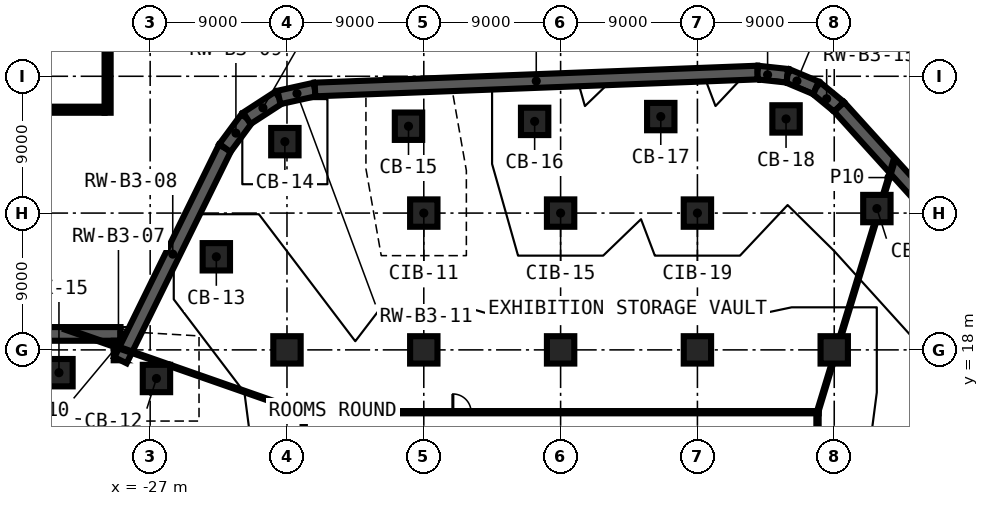
"""IFC4 building model, lengths in metres.
Left out: names, types, materials, properties, quantities, classifications, styles, units other than length and angle.
Written with IfcOpenShell. Run it as: python <this file> out.ifc"""

import sys

from ifc_helpers import new_model, si_unit, direction, frame, frame_2d, origin, origin_2d, place, context, subcontext, project, spatial, polyline, rectangle, outline, extrude, element, fill, save


model = new_model("IFC4")
c1 = context("Model", 3, precision=1e-05, world=origin(), true_north=direction((0.0, 1.0)))
c2 = subcontext(c1, "Body", "Model", "MODEL_VIEW")
j1 = project(units=[si_unit("LENGTHUNIT", "METRE"), si_unit("PLANEANGLEUNIT", "RADIAN")], contexts=[c1])
p1 = place(None, origin())
s1 = spatial("IfcSite", under=j1, at=p1, CompositionType="ELEMENT")
p2 = place(p1, origin())
s2 = spatial("IfcBuilding", under=s1, at=p2, CompositionType="ELEMENT")
p3 = place(p2, frame((0.0, 0.0, -17.0)))
s3 = spatial("IfcBuildingStorey", under=s2, at=p3, CompositionType="ELEMENT", Elevation=-17.0)
for number, where, z_axis, x_axis in (
    (1, (-26.586, 16.118, 0.0), (0.0, 0.0, 1.0), (1.0, 0.0, 0.0)),
    (2, (-22.648, 24.125, 0.0), (0.0, 0.0, 1.0), (1.0, 0.0, 0.0)),
    (3, (-18.139, 31.699, 0.0), (0.0, 0.0, 1.0), (1.0, 0.0, 0.0)),
    (4, (-10.006, 32.714, 0.0), (0.0, 0.0, 1.0), (1.0, 0.0, 0.0)),
    (5, (-1.708, 33.032, 0.0), (0.0, 0.0, 1.0), (1.0, 0.0, 0.0)),
    (6, (6.589, 33.349, 0.0), (0.0, 0.0, 1.0), (1.0, 0.0, 0.0)),
    (7, (14.83, 33.194, 0.0), (0.0, 0.0, 1.0), (1.0, 0.0, 0.0)),
    (8, (20.805, 27.297, 0.0), (0.0, 0.0, 1.0), (1.0, 0.0, 0.0)),
    (9, (-18.0, 18.0, 0.0), (0.0, 0.0, 1.0), (1.0, 0.0, 0.0)),
    (10, (-9.0, 18.0, 0.0), (0.0, 0.0, 1.0), (1.0, 0.0, 0.0)),
    (11, (-9.0, 27.0, 0.0), (0.0, 0.0, 1.0), (1.0, 0.0, 0.0)),
    (12, (0.0, 18.0, 0.0), (0.0, 0.0, 1.0), (1.0, 0.0, 0.0)),
    (13, (0.0, 27.0, 0.0), (0.0, 0.0, 1.0), (1.0, 0.0, 0.0)),
    (14, (9.0, 18.0, 0.0), (0.0, 0.0, 1.0), (1.0, 0.0, 0.0)),
    (15, (9.0, 27.0, 0.0), (0.0, 0.0, 1.0), (1.0, 0.0, 0.0)),
    (16, (18.0, 18.0, 0.0), (0.0, 0.0, 1.0), (1.0, 0.0, 0.0)),
    (17, (-33.0, 16.5, 0.0), (0.0, 0.0, 1.0), (1.0, 0.0, 0.0)),
):
    element("IfcColumn", number, at=place(p3, frame(where, z_axis=z_axis, x_axis=x_axis)), inside=s3, PredefinedType="COLUMN", context=c2, shape_type="SweptSolid", body=[
        extrude(rectangle(XDim=1.8, YDim=1.8, at=origin_2d()), origin(), (0.0, 0.0, 1.0), 5.1),
    ])
p4 = place(p3, frame((-59.05, 19.05, 0.0), z_axis=(0.0, 0.0, 1.0), x_axis=(1.0, 0.0, 0.0)))
e18 = element("IfcWall", 18, at=p4, inside=s3, PredefinedType="SHEAR", context=c2, shape_type="SweptSolid", body=[
    extrude(rectangle(XDim=30.1, YDim=0.9, at=frame_2d((15.05, 0.0))), origin(), (0.0, 0.0, 1.0), 5.1),
])
p5 = place(p3, origin())
e19 = element("IfcWall", 19, at=p5, inside=s3, PredefinedType="SHEAR", context=c2, shape_type="SweptSolid", body=[
    extrude(outline(polyline([(-29.4, 17.317), (-28.95, 17.317), (-29.354, 17.515), (-28.599, 19.05), (-28.95, 19.05), (-28.95, 18.6), (-29.4, 18.6), (-29.4, 17.317)])), origin(), (0.0, 0.0, 1.0), 5.1),
])
p6 = place(p3, frame((-28.95, 17.317, 0.0), z_axis=(0.0, 0.0, 1.0), x_axis=(0.441350917098, 0.897334590873, 0.0)))
e20 = element("IfcWall", 20, at=p6, inside=s3, PredefinedType="SHEAR", context=c2, shape_type="SweptSolid", body=[
    extrude(rectangle(XDim=15.567, YDim=0.9, at=frame_2d((7.783, 0.0))), origin(), (0.0, 0.0, 1.0), 5.1),
])
p7 = place(p3, frame((-22.08, 31.285, 0.0), z_axis=(0.0, 0.0, 1.0), x_axis=(0.594215473741, 0.804305893779, 0.0)))
e21 = element("IfcWall", 21, at=p7, inside=s3, PredefinedType="SHEAR", context=c2, shape_type="SweptSolid", body=[
    extrude(rectangle(XDim=2.424, YDim=0.9, at=frame_2d((1.212, 0.0))), origin(), (0.0, 0.0, 1.0), 5.1),
])
p8 = place(p3, frame((-20.639, 33.235, 0.0), z_axis=(0.0, 0.0, 1.0), x_axis=(0.838638354795, 0.544688635705, 0.0)))
e22 = element("IfcWall", 22, at=p8, inside=s3, PredefinedType="SHEAR", context=c2, shape_type="SweptSolid", body=[
    extrude(rectangle(XDim=2.52, YDim=0.9, at=frame_2d((1.26, 0.0))), origin(), (0.0, 0.0, 1.0), 5.1),
])
p9 = place(p3, frame((-18.526, 34.608, 0.0), z_axis=(0.0, 0.0, 1.0), x_axis=(0.976451748541, 0.215735909786, 0.0)))
e23 = element("IfcWall", 23, at=p9, inside=s3, PredefinedType="SHEAR", context=c2, shape_type="SweptSolid", body=[
    extrude(rectangle(XDim=2.424, YDim=0.9, at=frame_2d((1.212, 0.0))), origin(), (0.0, 0.0, 1.0), 5.1),
])
p10 = place(p3, frame((-16.159, 35.131, 0.0), z_axis=(0.0, 0.0, 1.0), x_axis=(0.999269062673, 0.038227482067, 0.0)))
e24 = element("IfcWall", 24, at=p10, inside=s3, PredefinedType="SHEAR", context=c2, shape_type="SweptSolid", body=[
    extrude(rectangle(XDim=29.135, YDim=0.9, at=frame_2d((14.568, 0.0))), origin(), (0.0, 0.0, 1.0), 5.1),
])
p11 = place(p3, origin())
e25 = element("IfcWall", 25, at=p11, inside=s3, PredefinedType="SHEAR", context=c2, shape_type="SweptSolid", body=[
    extrude(outline(polyline([(14.962, 36.481), (13.003, 36.692), (12.955, 36.244), (12.972, 35.795), (12.94, 35.794), (14.866, 35.586), (14.962, 36.481)])), origin(), (0.0, 0.0, 1.0), 5.1),
])
p12 = place(p3, origin())
e26 = element("IfcWall", 26, at=p12, inside=s3, PredefinedType="SHEAR", context=c2, shape_type="SweptSolid", body=[
    extrude(outline(polyline([(16.976, 35.654), (15.089, 36.448), (14.914, 36.033), (14.866, 35.586), (14.801, 35.593), (16.627, 34.824), (16.976, 35.654)])), origin(), (0.0, 0.0, 1.0), 5.1),
])
p13 = place(p3, origin())
e27 = element("IfcWall", 27, at=p13, inside=s3, PredefinedType="SHEAR", context=c2, shape_type="SweptSolid", body=[
    extrude(outline(polyline([(18.609, 34.333), (17.088, 35.586), (16.802, 35.239), (16.627, 34.824), (16.567, 34.85), (18.011, 33.659), (17.989, 33.684), (18.323, 33.986), (18.609, 34.333)])), origin(), (0.0, 0.0, 1.0), 5.1),
])
p14 = place(p3, frame((18.323, 33.986, 0.0), z_axis=(0.0, 0.0, 1.0), x_axis=(0.671255569768, -0.741225984471, 0.0)))
e28 = element("IfcWall", 28, at=p14, inside=s3, PredefinedType="SHEAR", context=c2, shape_type="SweptSolid", body=[
    extrude(rectangle(XDim=20.15, YDim=0.9, at=frame_2d((10.075, 0.0))), origin(), (0.0, 0.0, 1.0), 5.1),
])
p15 = place(p3, frame((-16.975, 13.9, 0.0), z_axis=(0.0, 0.0, 1.0), x_axis=(1.0, 0.0, 0.0)))
e29 = element("IfcWall", 29, at=p15, inside=s3, PredefinedType="PARTITIONING", context=c2, shape_type="SweptSolid", body=[
    extrude(rectangle(XDim=33.95, YDim=0.15, at=frame_2d((16.975, 0.0))), origin(), (0.0, 0.0, 1.0), 5.1),
])
p16 = place(p15, frame((9.887, 0.0, 0.0)))
e30 = element("IfcOpeningElement", 30, at=p16, cuts=e29, PredefinedType="OPENING", context=c2, shape_type="SweptSolid", body=[
    extrude(rectangle(XDim=1.2, YDim=2.1, at=frame_2d((0.6, 1.05))), frame((0.0, 0.085, 0.0), z_axis=(0.0, -1.0, 0.0), x_axis=(1.0, 0.0, 0.0)), (0.0, 0.0, 1.0), 0.17),
])
p17 = place(p3, frame((16.9, 13.9, 0.0), z_axis=(0.0, 0.0, 1.0), x_axis=(0.291202273884, 0.95666150528, 0.0)))
e31 = element("IfcWall", 31, at=p17, inside=s3, PredefinedType="PARTITIONING", context=c2, shape_type="SweptSolid", body=[
    extrude(rectangle(XDim=3.345, YDim=0.1, at=frame_2d((1.673, 0.0))), origin(), (0.0, 0.0, 1.0), 5.1),
])
p18 = place(p3, frame((18.422, 18.9, 0.0), z_axis=(0.0, 0.0, 1.0), x_axis=(0.291192607523, 0.956664447611, 0.0)))
e32 = element("IfcWall", 32, at=p18, inside=s3, PredefinedType="PARTITIONING", context=c2, shape_type="SweptSolid", body=[
    extrude(rectangle(XDim=7.837, YDim=0.1, at=frame_2d((3.918, 0.0))), origin(), (0.0, 0.0, 1.0), 5.1),
])
p19 = place(p3, frame((21.252, 28.197, 0.0), z_axis=(0.0, 0.0, 1.0), x_axis=(0.291210561393, 0.956658982571, 0.0)))
e33 = element("IfcWall", 33, at=p19, inside=s3, PredefinedType="PARTITIONING", context=c2, shape_type="SweptSolid", body=[
    extrude(rectangle(XDim=2.382, YDim=0.1, at=frame_2d((1.191, 0.0))), origin(), (0.0, 0.0, 1.0), 5.1),
])
p20 = place(p3, frame((16.9, 13.825, 0.0), z_axis=(0.0, 0.0, 1.0), x_axis=(0.0, -1.0, 0.0)))
e34 = element("IfcWall", 34, at=p20, inside=s3, PredefinedType="PARTITIONING", context=c2, shape_type="SweptSolid", body=[
    extrude(rectangle(XDim=27.65, YDim=0.15, at=frame_2d((13.825, 0.0))), origin(), (0.0, 0.0, 1.0), 5.1),
])
p21 = place(p20, frame((18.445, 0.0, 0.0)))
e35 = element("IfcOpeningElement", 35, at=p21, cuts=e34, PredefinedType="OPENING", context=c2, shape_type="SweptSolid", body=[
    extrude(rectangle(XDim=1.2, YDim=2.1, at=frame_2d((0.6, 1.05))), frame((0.0, 0.085, 0.0), z_axis=(0.0, -1.0, 0.0), x_axis=(1.0, 0.0, 0.0)), (0.0, 0.0, 1.0), 0.17),
])
p22 = place(p3, frame((-16.9, -13.825, 0.0), z_axis=(0.0, 0.0, 1.0), x_axis=(0.0, 1.0, 0.0)))
e36 = element("IfcWall", 36, at=p22, inside=s3, PredefinedType="PARTITIONING", context=c2, shape_type="SweptSolid", body=[
    extrude(rectangle(XDim=27.65, YDim=0.15, at=frame_2d((13.825, 0.0))), origin(), (0.0, 0.0, 1.0), 5.1),
])
p23 = place(p22, frame((18.445, 0.0, 0.0)))
e37 = element("IfcOpeningElement", 37, at=p23, cuts=e36, PredefinedType="OPENING", context=c2, shape_type="SweptSolid", body=[
    extrude(rectangle(XDim=1.2, YDim=2.1, at=frame_2d((0.6, 1.05))), frame((0.0, 0.085, 0.0), z_axis=(0.0, -1.0, 0.0), x_axis=(1.0, 0.0, 0.0)), (0.0, 0.0, 1.0), 0.17),
])
p24 = place(p3, frame((-32.585, 19.38, 0.0), z_axis=(0.0, 0.0, 1.0), x_axis=(0.944040530472, -0.329829466279, 0.0)))
e38 = element("IfcWall", 38, at=p24, inside=s3, PredefinedType="PARTITIONING", context=c2, shape_type="SweptSolid", body=[
    extrude(rectangle(XDim=7.161, YDim=0.1, at=frame_2d((3.58, 0.0))), origin(), (0.0, 0.0, 1.0), 5.1),
])
p25 = place(p3, frame((-25.686, 16.969, 0.0), z_axis=(0.0, 0.0, 1.0), x_axis=(0.944025503462, -0.329872473561, 0.0)))
e39 = element("IfcWall", 39, at=p25, inside=s3, PredefinedType="PARTITIONING", context=c2, shape_type="SweptSolid", body=[
    extrude(rectangle(XDim=9.307, YDim=0.1, at=frame_2d((4.653, 0.0))), origin(), (0.0, 0.0, 1.0), 5.1),
])
p26 = place(p3, frame((-62.1, 33.8, 0.0), z_axis=(0.0, 0.0, 1.0), x_axis=(1.0, 0.0, 0.0)))
e40 = element("IfcWall", 40, at=p26, inside=s3, PredefinedType="SOLIDWALL", context=c2, shape_type="SweptSolid", body=[
    extrude(rectangle(XDim=32.1, YDim=0.4, at=frame_2d((16.05, 0.0))), origin(), (0.0, 0.0, 1.0), 5.5),
])
p27 = place(p3, frame((-29.8, 33.6, 0.0), z_axis=(0.0, 0.0, 1.0), x_axis=(0.0, 1.0, 0.0)))
e41 = element("IfcWall", 41, at=p27, inside=s3, PredefinedType="SOLIDWALL", context=c2, shape_type="SweptSolid", body=[
    extrude(rectangle(XDim=20.4, YDim=0.4, at=frame_2d((10.2, 0.0))), origin(), (0.0, 0.0, 1.0), 5.5),
])
p28 = place(p16, origin())
e42 = element("IfcDoor", 42, at=p28, inside=s3, OperationType="SINGLE_SWING_RIGHT", PredefinedType="DOOR", context=c2, shape_type="SweptSolid", body=[
    extrude(rectangle(XDim=1.2, YDim=2.1, at=frame_2d((0.6, 1.05))), frame((0.0, 0.025, 0.0), z_axis=(0.0, -1.0, 0.0), x_axis=(1.0, 0.0, 0.0)), (0.0, 0.0, 1.0), 0.05),
])
fill(e30, e42)
save(model, sys.argv[1])
